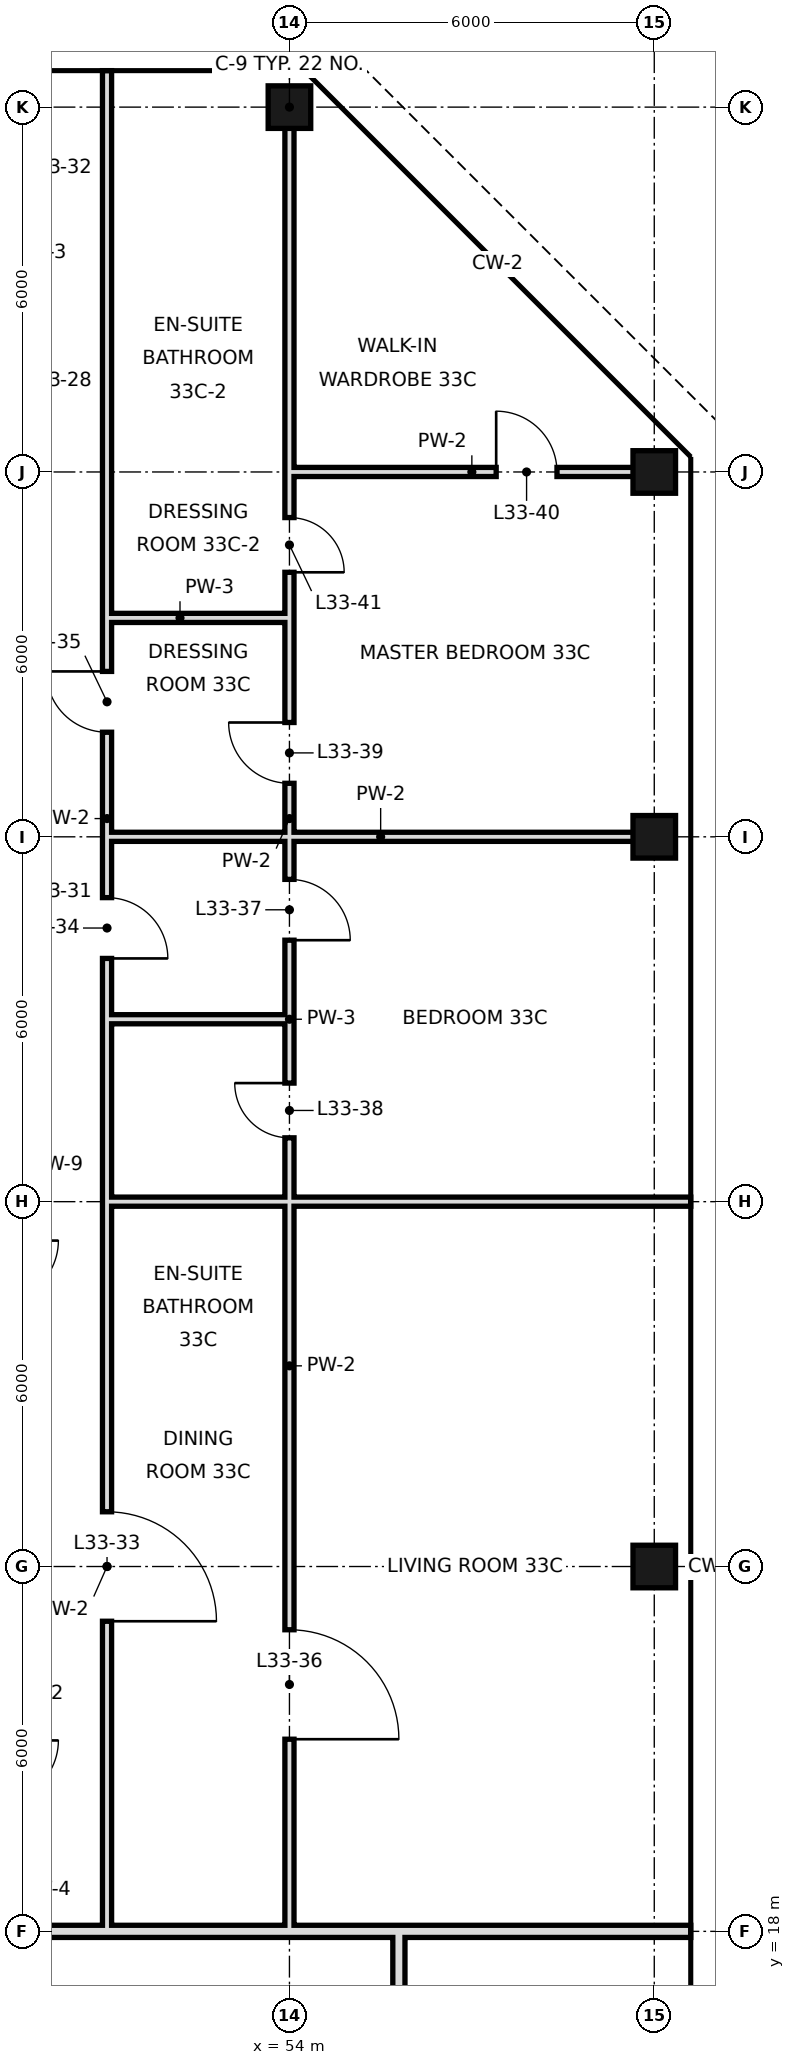
"""IFC4 building model, lengths in metres.
Left out: names, types, materials, properties, quantities, classifications, styles, units other than length and angle.
Written with IfcOpenShell. Run it as: python <this file> out.ifc"""

import sys

from ifc_helpers import new_model, si_unit, direction, frame, frame_2d, origin, origin_2d, place, context, subcontext, project, spatial, rectangle, hollow_rectangle, extrude, element, fill, save


model = new_model("IFC4")
c1 = context("Model", 3, precision=1e-05, world=origin(), true_north=direction((0.0, 1.0)))
c2 = subcontext(c1, "Body", "Model", "MODEL_VIEW")
j1 = project(units=[si_unit("LENGTHUNIT", "METRE"), si_unit("PLANEANGLEUNIT", "RADIAN")], contexts=[c1])
p1 = place(None, origin())
s1 = spatial("IfcSite", under=j1, at=p1, CompositionType="ELEMENT")
p2 = place(p1, origin())
s2 = spatial("IfcBuilding", under=s1, at=p2, CompositionType="ELEMENT")
p3 = place(p2, frame((0.0, 0.0, 147.4)))
s3 = spatial("IfcBuildingStorey", under=s2, at=p3, CompositionType="ELEMENT", Elevation=147.4)
for number, where, z_axis, x_axis in (
    (1, (54.0, 48.0, 0.0), (0.0, 0.0, 1.0), (1.0, 0.0, 0.0)),
    (2, (60.0, 24.0, 0.0), (0.0, 0.0, 1.0), (1.0, 0.0, 0.0)),
    (3, (60.0, 36.0, 0.0), (0.0, 0.0, 1.0), (1.0, 0.0, 0.0)),
    (4, (60.0, 42.0, 0.0), (0.0, 0.0, 1.0), (1.0, 0.0, 0.0)),
):
    element("IfcColumn", number, at=place(p3, frame(where, z_axis=z_axis, x_axis=x_axis)), inside=s3, PredefinedType="COLUMN", context=c2, shape_type="SweptSolid", body=[
        extrude(hollow_rectangle(XDim=0.7, YDim=0.7, WallThickness=0.036, at=origin_2d()), origin(), (0.0, 0.0, 1.0), 3.6),
    ])
p4 = place(p3, frame((51.0, 18.0, 0.0), z_axis=(0.0, 0.0, 1.0), x_axis=(0.0, 1.0, 0.0)))
e5 = element("IfcWall", 5, at=p4, inside=s3, PredefinedType="PARTITIONING", context=c2, shape_type="SweptSolid", body=[
    extrude(rectangle(XDim=12.0, YDim=0.15, at=frame_2d((6.0, 0.0))), origin(), (0.0, 0.0, 1.0), 3.42),
])
p5 = place(p4, frame((5.1, 0.0, 0.0)))
e6 = element("IfcOpeningElement", 6, at=p5, cuts=e5, PredefinedType="OPENING", context=c2, shape_type="SweptSolid", body=[
    extrude(rectangle(XDim=1.8, YDim=2.4, at=frame_2d((0.9, 1.2))), frame((0.0, 0.085, 0.0), z_axis=(0.0, -1.0, 0.0), x_axis=(1.0, 0.0, 0.0)), (0.0, 0.0, 1.0), 0.17),
])
p6 = place(p3, frame((51.0, 33.0, 0.0), z_axis=(0.0, 0.0, 1.0), x_axis=(0.0, 1.0, 0.0)))
e7 = element("IfcWall", 7, at=p6, inside=s3, PredefinedType="PARTITIONING", context=c2, shape_type="SweptSolid", body=[
    extrude(rectangle(XDim=6.6, YDim=0.15, at=frame_2d((3.3, 0.0))), origin(), (0.0, 0.0, 1.0), 3.42),
])
p7 = place(p6, frame((1.0, 0.0, 0.0)))
e8 = element("IfcOpeningElement", 8, at=p7, cuts=e7, PredefinedType="OPENING", context=c2, shape_type="SweptSolid", body=[
    extrude(rectangle(XDim=1.0, YDim=2.4, at=frame_2d((0.5, 1.2))), frame((0.0, 0.085, 0.0), z_axis=(0.0, -1.0, 0.0), x_axis=(1.0, 0.0, 0.0)), (0.0, 0.0, 1.0), 0.17),
])
p8 = place(p6, frame((4.72, 0.0, 0.0)))
e9 = element("IfcOpeningElement", 9, at=p8, cuts=e7, PredefinedType="OPENING", context=c2, shape_type="SweptSolid", body=[
    extrude(rectangle(XDim=1.0, YDim=2.4, at=frame_2d((0.5, 1.2))), frame((0.0, 0.085, 0.0), z_axis=(0.0, -1.0, 0.0), x_axis=(1.0, 0.0, 0.0)), (0.0, 0.0, 1.0), 0.17),
])
p9 = place(p3, frame((51.0, 30.0, 0.0), z_axis=(0.0, 0.0, 1.0), x_axis=(0.0, 1.0, 0.0)))
e10 = element("IfcWall", 10, at=p9, inside=s3, PredefinedType="PARTITIONING", context=c2, shape_type="SweptSolid", body=[
    extrude(rectangle(XDim=3.0, YDim=0.15, at=frame_2d((1.5, 0.0))), origin(), (0.0, 0.0, 1.0), 3.42),
])
p10 = place(p3, frame((51.0, 39.6, 0.0), z_axis=(0.0, 0.0, 1.0), x_axis=(0.0, 1.0, 0.0)))
e11 = element("IfcWall", 11, at=p10, inside=s3, PredefinedType="PARTITIONING", context=c2, shape_type="SweptSolid", body=[
    extrude(rectangle(XDim=9.0, YDim=0.15, at=frame_2d((4.5, 0.0))), origin(), (0.0, 0.0, 1.0), 3.42),
])
p11 = place(p3, frame((54.0, 18.0, 0.0), z_axis=(0.0, 0.0, 1.0), x_axis=(0.0, 1.0, 0.0)))
e12 = element("IfcWall", 12, at=p11, inside=s3, PredefinedType="PARTITIONING", context=c2, shape_type="SweptSolid", body=[
    extrude(rectangle(XDim=12.0, YDim=0.15, at=frame_2d((6.0, 0.0))), origin(), (0.0, 0.0, 1.0), 3.42),
])
p12 = place(p11, frame((3.16, 0.0, 0.0)))
e13 = element("IfcOpeningElement", 13, at=p12, cuts=e12, PredefinedType="OPENING", context=c2, shape_type="SweptSolid", body=[
    extrude(rectangle(XDim=1.8, YDim=2.4, at=frame_2d((0.9, 1.2))), frame((0.0, 0.085, 0.0), z_axis=(0.0, -1.0, 0.0), x_axis=(1.0, 0.0, 0.0)), (0.0, 0.0, 1.0), 0.17),
])
p13 = place(p3, frame((54.0, 33.0, 0.0), z_axis=(0.0, 0.0, 1.0), x_axis=(0.0, 1.0, 0.0)))
e14 = element("IfcWall", 14, at=p13, inside=s3, PredefinedType="PARTITIONING", context=c2, shape_type="SweptSolid", body=[
    extrude(rectangle(XDim=6.6, YDim=0.15, at=frame_2d((3.3, 0.0))), origin(), (0.0, 0.0, 1.0), 3.42),
])
p14 = place(p13, frame((1.3, 0.0, 0.0)))
e15 = element("IfcOpeningElement", 15, at=p14, cuts=e14, PredefinedType="OPENING", context=c2, shape_type="SweptSolid", body=[
    extrude(rectangle(XDim=1.0, YDim=2.4, at=frame_2d((0.5, 1.2))), frame((0.0, 0.085, 0.0), z_axis=(0.0, -1.0, 0.0), x_axis=(1.0, 0.0, 0.0)), (0.0, 0.0, 1.0), 0.17),
])
p15 = place(p13, frame((3.88, 0.0, 0.0)))
e16 = element("IfcOpeningElement", 16, at=p15, cuts=e14, PredefinedType="OPENING", context=c2, shape_type="SweptSolid", body=[
    extrude(rectangle(XDim=1.0, YDim=2.4, at=frame_2d((0.5, 1.2))), frame((0.0, 0.085, 0.0), z_axis=(0.0, -1.0, 0.0), x_axis=(1.0, 0.0, 0.0)), (0.0, 0.0, 1.0), 0.17),
])
p16 = place(p3, frame((54.0, 30.0, 0.0), z_axis=(0.0, 0.0, 1.0), x_axis=(0.0, 1.0, 0.0)))
e17 = element("IfcWall", 17, at=p16, inside=s3, PredefinedType="PARTITIONING", context=c2, shape_type="SweptSolid", body=[
    extrude(rectangle(XDim=3.0, YDim=0.15, at=frame_2d((1.5, 0.0))), origin(), (0.0, 0.0, 1.0), 3.42),
])
p17 = place(p16, frame((1.05, 0.0, 0.0)))
e18 = element("IfcOpeningElement", 18, at=p17, cuts=e17, PredefinedType="OPENING", context=c2, shape_type="SweptSolid", body=[
    extrude(rectangle(XDim=0.9, YDim=2.4, at=frame_2d((0.45, 1.2))), frame((0.0, 0.085, 0.0), z_axis=(0.0, -1.0, 0.0), x_axis=(1.0, 0.0, 0.0)), (0.0, 0.0, 1.0), 0.17),
])
p18 = place(p3, frame((54.0, 39.6, 0.0), z_axis=(0.0, 0.0, 1.0), x_axis=(0.0, 1.0, 0.0)))
e19 = element("IfcWall", 19, at=p18, inside=s3, PredefinedType="PARTITIONING", context=c2, shape_type="SweptSolid", body=[
    extrude(rectangle(XDim=8.4, YDim=0.15, at=frame_2d((4.2, 0.0))), origin(), (0.0, 0.0, 1.0), 3.42),
])
p19 = place(p18, frame((0.75, 0.0, 0.0)))
e20 = element("IfcOpeningElement", 20, at=p19, cuts=e19, PredefinedType="OPENING", context=c2, shape_type="SweptSolid", body=[
    extrude(rectangle(XDim=0.9, YDim=2.4, at=frame_2d((0.45, 1.2))), frame((0.0, 0.085, 0.0), z_axis=(0.0, -1.0, 0.0), x_axis=(1.0, 0.0, 0.0)), (0.0, 0.0, 1.0), 0.17),
])
p20 = place(p3, frame((55.8, 10.8, 0.0), z_axis=(0.0, 0.0, 1.0), x_axis=(0.0, 1.0, 0.0)))
e21 = element("IfcWall", 21, at=p20, inside=s3, PredefinedType="SOLIDWALL", context=c2, shape_type="SweptSolid", body=[
    extrude(rectangle(XDim=7.2, YDim=0.2, at=frame_2d((3.6, 0.0))), origin(), (0.0, 0.0, 1.0), 2.72),
])
p21 = place(p3, frame((55.8, 18.0, 0.0), z_axis=(0.0, 0.0, 1.0), x_axis=(1.0, 0.0, 0.0)))
e22 = element("IfcWall", 22, at=p21, inside=s3, PredefinedType="SOLIDWALL", context=c2, shape_type="SweptSolid", body=[
    extrude(rectangle(XDim=4.8, YDim=0.2, at=frame_2d((2.4, 0.0))), origin(), (0.0, 0.0, 1.0), 2.72),
])
p22 = place(p3, frame((44.9, 18.0, 0.0), z_axis=(0.0, 0.0, 1.0), x_axis=(1.0, 0.0, 0.0)))
e23 = element("IfcWall", 23, at=p22, inside=s3, PredefinedType="SOLIDWALL", context=c2, shape_type="SweptSolid", body=[
    extrude(rectangle(XDim=10.9, YDim=0.2, at=frame_2d((5.45, 0.0))), origin(), (0.0, 0.0, 1.0), 2.72),
])
p23 = place(p3, frame((54.0, 30.0, 0.0), z_axis=(0.0, 0.0, 1.0), x_axis=(1.0, 0.0, 0.0)))
e24 = element("IfcWall", 24, at=p23, inside=s3, PredefinedType="PARTITIONING", context=c2, shape_type="SweptSolid", body=[
    extrude(rectangle(XDim=6.6, YDim=0.15, at=frame_2d((3.3, 0.0))), origin(), (0.0, 0.0, 1.0), 2.72),
])
p24 = place(p3, frame((51.0, 30.0, 0.0), z_axis=(0.0, 0.0, 1.0), x_axis=(1.0, 0.0, 0.0)))
e25 = element("IfcWall", 25, at=p24, inside=s3, PredefinedType="PARTITIONING", context=c2, shape_type="SweptSolid", body=[
    extrude(rectangle(XDim=3.0, YDim=0.15, at=frame_2d((1.5, 0.0))), origin(), (0.0, 0.0, 1.0), 2.72),
])
p25 = place(p3, frame((51.0, 33.0, 0.0), z_axis=(0.0, 0.0, 1.0), x_axis=(1.0, 0.0, 0.0)))
e26 = element("IfcWall", 26, at=p25, inside=s3, PredefinedType="PARTITIONING", context=c2, shape_type="SweptSolid", body=[
    extrude(rectangle(XDim=3.0, YDim=0.15, at=frame_2d((1.5, 0.0))), origin(), (0.0, 0.0, 1.0), 3.42),
])
p26 = place(p3, frame((51.0, 36.0, 0.0), z_axis=(0.0, 0.0, 1.0), x_axis=(1.0, 0.0, 0.0)))
e27 = element("IfcWall", 27, at=p26, inside=s3, PredefinedType="PARTITIONING", context=c2, shape_type="SweptSolid", body=[
    extrude(rectangle(XDim=9.0, YDim=0.15, at=frame_2d((4.5, 0.0))), origin(), (0.0, 0.0, 1.0), 2.72),
])
p27 = place(p3, frame((51.0, 39.6, 0.0), z_axis=(0.0, 0.0, 1.0), x_axis=(1.0, 0.0, 0.0)))
e28 = element("IfcWall", 28, at=p27, inside=s3, PredefinedType="PARTITIONING", context=c2, shape_type="SweptSolid", body=[
    extrude(rectangle(XDim=3.0, YDim=0.15, at=frame_2d((1.5, 0.0))), origin(), (0.0, 0.0, 1.0), 3.42),
])
p28 = place(p3, frame((54.0, 42.0, 0.0), z_axis=(0.0, 0.0, 1.0), x_axis=(1.0, 0.0, 0.0)))
e29 = element("IfcWall", 29, at=p28, inside=s3, PredefinedType="PARTITIONING", context=c2, shape_type="SweptSolid", body=[
    extrude(rectangle(XDim=6.0, YDim=0.15, at=frame_2d((3.0, 0.0))), origin(), (0.0, 0.0, 1.0), 2.72),
])
p29 = place(p28, frame((3.4, 0.0, 0.0)))
e30 = element("IfcOpeningElement", 30, at=p29, cuts=e29, PredefinedType="OPENING", context=c2, shape_type="SweptSolid", body=[
    extrude(rectangle(XDim=1.0, YDim=2.4, at=frame_2d((0.5, 1.2))), frame((0.0, 0.085, 0.0), z_axis=(0.0, -1.0, 0.0), x_axis=(1.0, 0.0, 0.0)), (0.0, 0.0, 1.0), 0.17),
])
p30 = place(p5, frame((1.8, 0.0, 0.0), z_axis=(0.0, 0.0, 1.0), x_axis=(-1.0, 0.0, 0.0)))
e31 = element("IfcDoor", 31, at=p30, inside=s3, OperationType="SINGLE_SWING_RIGHT", PredefinedType="DOOR", context=c2, shape_type="SweptSolid", body=[
    extrude(rectangle(XDim=1.8, YDim=2.4, at=frame_2d((0.9, 1.2))), frame((0.0, 0.025, 0.0), z_axis=(0.0, -1.0, 0.0), x_axis=(1.0, 0.0, 0.0)), (0.0, 0.0, 1.0), 0.05),
])
fill(e6, e31)
p31 = place(p7, frame((1.0, 0.0, 0.0), z_axis=(0.0, 0.0, 1.0), x_axis=(-1.0, 0.0, 0.0)))
e32 = element("IfcDoor", 32, at=p31, inside=s3, OperationType="SINGLE_SWING_RIGHT", PredefinedType="DOOR", context=c2, shape_type="SweptSolid", body=[
    extrude(rectangle(XDim=1.0, YDim=2.4, at=frame_2d((0.5, 1.2))), frame((0.0, 0.025, 0.0), z_axis=(0.0, -1.0, 0.0), x_axis=(1.0, 0.0, 0.0)), (0.0, 0.0, 1.0), 0.05),
])
fill(e8, e32)
p32 = place(p8, frame((1.0, 0.0, 0.0), z_axis=(0.0, 0.0, 1.0), x_axis=(-1.0, 0.0, 0.0)))
e33 = element("IfcDoor", 33, at=p32, inside=s3, OperationType="SINGLE_SWING_LEFT", PredefinedType="DOOR", context=c2, shape_type="SweptSolid", body=[
    extrude(rectangle(XDim=1.0, YDim=2.4, at=frame_2d((0.5, 1.2))), frame((0.0, 0.025, 0.0), z_axis=(0.0, -1.0, 0.0), x_axis=(1.0, 0.0, 0.0)), (0.0, 0.0, 1.0), 0.05),
])
fill(e9, e33)
p33 = place(p12, frame((1.8, 0.0, 0.0), z_axis=(0.0, 0.0, 1.0), x_axis=(-1.0, 0.0, 0.0)))
e34 = element("IfcDoor", 34, at=p33, inside=s3, OperationType="SINGLE_SWING_RIGHT", PredefinedType="DOOR", context=c2, shape_type="SweptSolid", body=[
    extrude(rectangle(XDim=1.8, YDim=2.4, at=frame_2d((0.9, 1.2))), frame((0.0, 0.025, 0.0), z_axis=(0.0, -1.0, 0.0), x_axis=(1.0, 0.0, 0.0)), (0.0, 0.0, 1.0), 0.05),
])
fill(e13, e34)
p34 = place(p14, frame((1.0, 0.0, 0.0), z_axis=(0.0, 0.0, 1.0), x_axis=(-1.0, 0.0, 0.0)))
e35 = element("IfcDoor", 35, at=p34, inside=s3, OperationType="SINGLE_SWING_RIGHT", PredefinedType="DOOR", context=c2, shape_type="SweptSolid", body=[
    extrude(rectangle(XDim=1.0, YDim=2.4, at=frame_2d((0.5, 1.2))), frame((0.0, 0.025, 0.0), z_axis=(0.0, -1.0, 0.0), x_axis=(1.0, 0.0, 0.0)), (0.0, 0.0, 1.0), 0.05),
])
fill(e15, e35)
p35 = place(p17, frame((0.9, 0.0, 0.0), z_axis=(0.0, 0.0, 1.0), x_axis=(-1.0, 0.0, 0.0)))
e36 = element("IfcDoor", 36, at=p35, inside=s3, OperationType="SINGLE_SWING_LEFT", PredefinedType="DOOR", context=c2, shape_type="SweptSolid", body=[
    extrude(rectangle(XDim=0.9, YDim=2.4, at=frame_2d((0.45, 1.2))), frame((0.0, 0.025, 0.0), z_axis=(0.0, -1.0, 0.0), x_axis=(1.0, 0.0, 0.0)), (0.0, 0.0, 1.0), 0.05),
])
fill(e18, e36)
p36 = place(p15, frame((1.0, 0.0, 0.0), z_axis=(0.0, 0.0, 1.0), x_axis=(-1.0, 0.0, 0.0)))
e37 = element("IfcDoor", 37, at=p36, inside=s3, OperationType="SINGLE_SWING_LEFT", PredefinedType="DOOR", context=c2, shape_type="SweptSolid", body=[
    extrude(rectangle(XDim=1.0, YDim=2.4, at=frame_2d((0.5, 1.2))), frame((0.0, 0.025, 0.0), z_axis=(0.0, -1.0, 0.0), x_axis=(1.0, 0.0, 0.0)), (0.0, 0.0, 1.0), 0.05),
])
fill(e16, e37)
p37 = place(p29, origin())
e38 = element("IfcDoor", 38, at=p37, inside=s3, OperationType="SINGLE_SWING_LEFT", PredefinedType="DOOR", context=c2, shape_type="SweptSolid", body=[
    extrude(rectangle(XDim=1.0, YDim=2.4, at=frame_2d((0.5, 1.2))), frame((0.0, 0.025, 0.0), z_axis=(0.0, -1.0, 0.0), x_axis=(1.0, 0.0, 0.0)), (0.0, 0.0, 1.0), 0.05),
])
fill(e30, e38)
p38 = place(p19, frame((0.9, 0.0, 0.0), z_axis=(0.0, 0.0, 1.0), x_axis=(-1.0, 0.0, 0.0)))
e39 = element("IfcDoor", 39, at=p38, inside=s3, OperationType="SINGLE_SWING_RIGHT", PredefinedType="DOOR", context=c2, shape_type="SweptSolid", body=[
    extrude(rectangle(XDim=0.9, YDim=2.4, at=frame_2d((0.45, 1.2))), frame((0.0, 0.025, 0.0), z_axis=(0.0, -1.0, 0.0), x_axis=(1.0, 0.0, 0.0)), (0.0, 0.0, 1.0), 0.05),
])
fill(e20, e39)
save(model, sys.argv[1])
